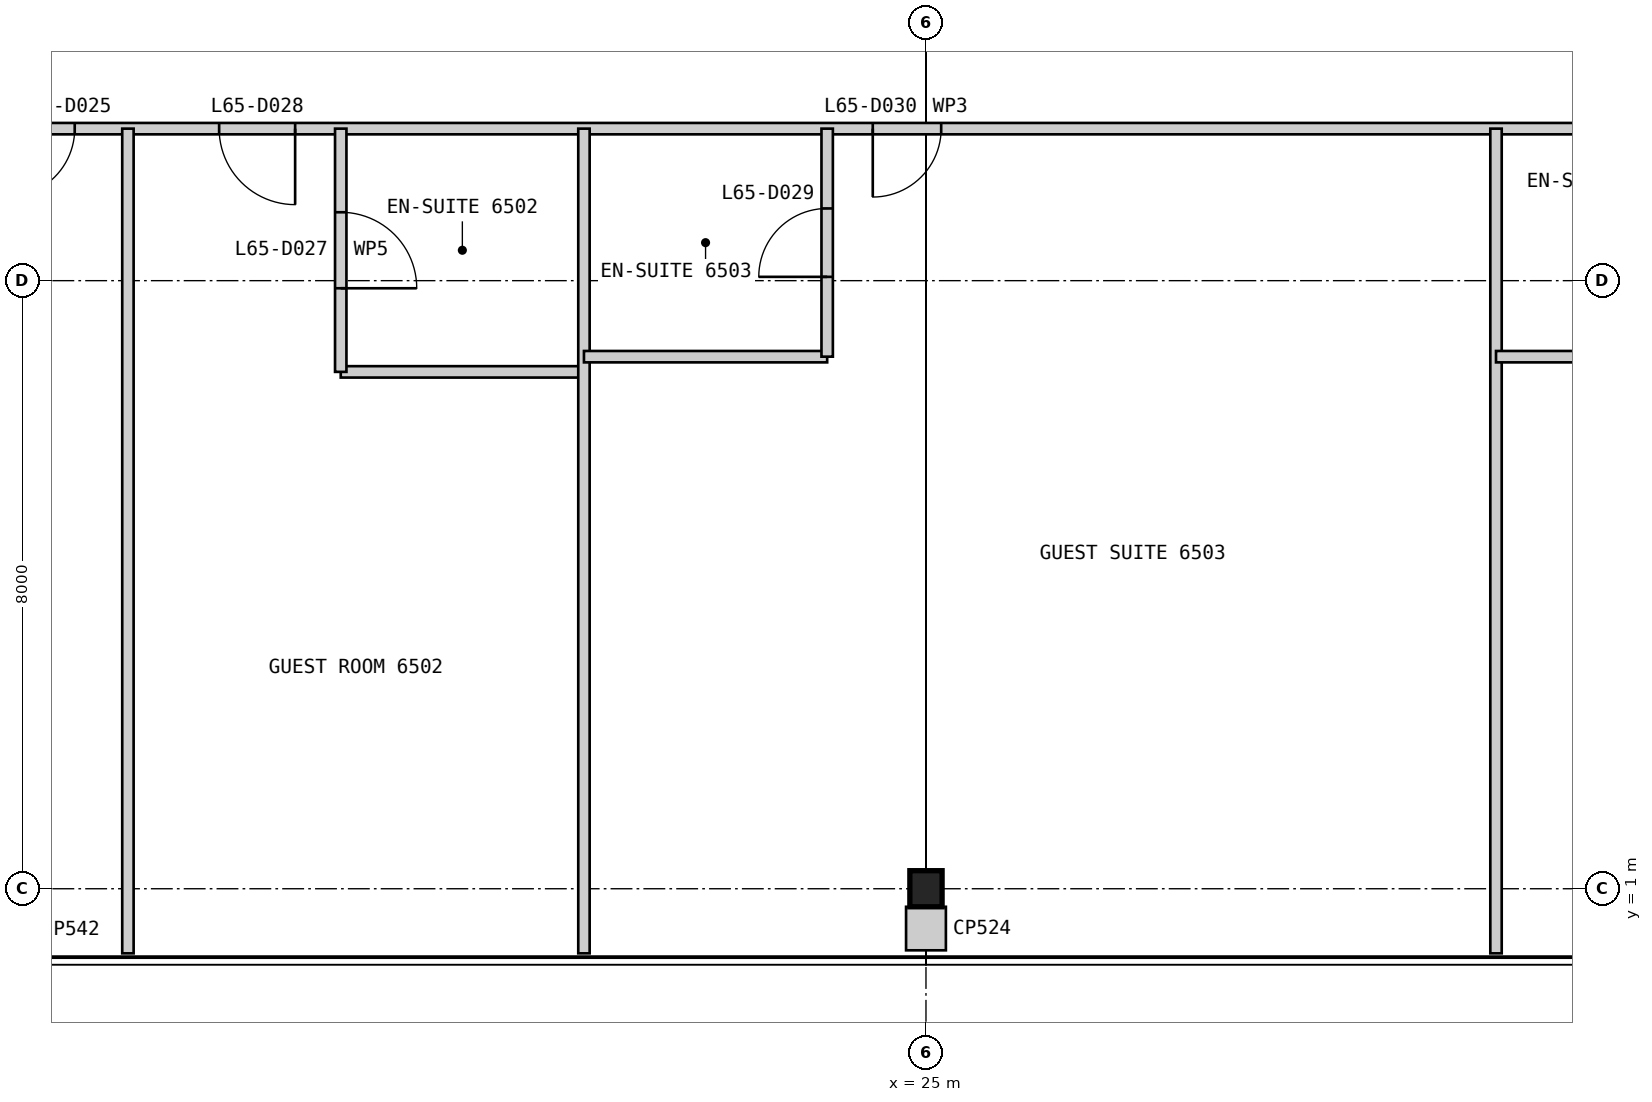
"""IFC4 building model, lengths in metres.
Left out: names, types, materials, properties, quantities, classifications, styles, units other than length and angle.
Written with IfcOpenShell. Run it as: python <this file> out.ifc"""

import sys

from ifc_helpers import new_model, si_unit, direction, frame, frame_2d, origin, origin_2d, place, context, subcontext, project, spatial, rectangle, i_section, extrude, element, fill, save


model = new_model("IFC4")
c1 = context("Model", 3, precision=1e-05, world=origin(), true_north=direction((0.0, 1.0)))
c2 = subcontext(c1, "Body", "Model", "MODEL_VIEW")
j1 = project(units=[si_unit("LENGTHUNIT", "METRE"), si_unit("PLANEANGLEUNIT", "RADIAN")], contexts=[c1])
p1 = place(None, origin())
s1 = spatial("IfcSite", under=j1, at=p1, CompositionType="ELEMENT")
p2 = place(p1, origin())
s2 = spatial("IfcBuilding", under=s1, at=p2, CompositionType="ELEMENT")
p3 = place(p2, frame((0.0, 0.0, 273.0)))
s3 = spatial("IfcBuildingStorey", under=s2, at=p3, CompositionType="ELEMENT", Elevation=273.0)
p4 = place(p3, frame((25.0, 1.0, 0.0), z_axis=(0.0, 0.0, 1.0), x_axis=(1.0, 0.0, 0.0)))
e1 = element("IfcColumn", 1, at=p4, inside=s3, PredefinedType="COLUMN", context=c2, shape_type="SweptSolid", body=[
    extrude(i_section(OverallWidth=0.424, OverallDepth=0.475, WebThickness=0.048, FlangeThickness=0.077, at=origin_2d()), origin(), (0.0, 0.0, 1.0), 3.4),
])
p5 = place(p3, frame((11.0, 11.0, 0.0), z_axis=(0.0, 0.0, 1.0), x_axis=(1.0, 0.0, 0.0)))
e2 = element("IfcWall", 2, at=p5, inside=s3, PredefinedType="PARTITIONING", context=c2, shape_type="SweptSolid", body=[
    extrude(rectangle(XDim=28.0, YDim=0.15, at=frame_2d((14.0, 0.0))), origin(), (0.0, 0.0, 1.0), 2.844),
])
p6 = place(p5, frame((1.9, 0.0, 0.0)))
e3 = element("IfcOpeningElement", 3, at=p6, cuts=e2, PredefinedType="OPENING", context=c2, shape_type="SweptSolid", body=[
    extrude(rectangle(XDim=0.9, YDim=2.1, at=frame_2d((0.45, 1.05))), frame((0.0, 0.085, 0.0), z_axis=(0.0, -1.0, 0.0), x_axis=(1.0, 0.0, 0.0)), (0.0, 0.0, 1.0), 0.17),
])
p7 = place(p5, frame((4.7, 0.0, 0.0)))
e4 = element("IfcOpeningElement", 4, at=p7, cuts=e2, PredefinedType="OPENING", context=c2, shape_type="SweptSolid", body=[
    extrude(rectangle(XDim=1.0, YDim=2.1, at=frame_2d((0.5, 1.05))), frame((0.0, 0.085, 0.0), z_axis=(0.0, -1.0, 0.0), x_axis=(1.0, 0.0, 0.0)), (0.0, 0.0, 1.0), 0.17),
])
p8 = place(p5, frame((13.3, 0.0, 0.0)))
e5 = element("IfcOpeningElement", 5, at=p8, cuts=e2, PredefinedType="OPENING", context=c2, shape_type="SweptSolid", body=[
    extrude(rectangle(XDim=0.9, YDim=2.1, at=frame_2d((0.45, 1.05))), frame((0.0, 0.085, 0.0), z_axis=(0.0, -1.0, 0.0), x_axis=(1.0, 0.0, 0.0)), (0.0, 0.0, 1.0), 0.17),
])
p9 = place(p5, frame((24.9, 0.0, 0.0)))
e6 = element("IfcOpeningElement", 6, at=p9, cuts=e2, PredefinedType="OPENING", context=c2, shape_type="SweptSolid", body=[
    extrude(rectangle(XDim=0.9, YDim=2.1, at=frame_2d((0.45, 1.05))), frame((0.0, 0.085, 0.0), z_axis=(0.0, -1.0, 0.0), x_axis=(1.0, 0.0, 0.0)), (0.0, 0.0, 1.0), 0.17),
])
p10 = place(p3, frame((14.5, 0.15, 0.0), z_axis=(0.0, 0.0, 1.0), x_axis=(0.0, 1.0, 0.0)))
e7 = element("IfcWall", 7, at=p10, inside=s3, PredefinedType="PARTITIONING", context=c2, shape_type="SweptSolid", body=[
    extrude(rectangle(XDim=10.85, YDim=0.15, at=frame_2d((5.425, 0.0))), origin(), (0.0, 0.0, 1.0), 3.25),
])
p11 = place(p3, frame((17.3, 7.8, 0.0), z_axis=(0.0, 0.0, 1.0), x_axis=(1.0, 0.0, 0.0)))
e8 = element("IfcWall", 8, at=p11, inside=s3, PredefinedType="PARTITIONING", context=c2, shape_type="SweptSolid", body=[
    extrude(rectangle(XDim=3.2, YDim=0.15, at=frame_2d((1.6, 0.0))), origin(), (0.0, 0.0, 1.0), 3.25),
])
p12 = place(p3, frame((17.3, 7.8, 0.0), z_axis=(0.0, 0.0, 1.0), x_axis=(0.0, 1.0, 0.0)))
e9 = element("IfcWall", 9, at=p12, inside=s3, PredefinedType="PARTITIONING", context=c2, shape_type="SweptSolid", body=[
    extrude(rectangle(XDim=3.2, YDim=0.15, at=frame_2d((1.6, 0.0))), origin(), (0.0, 0.0, 1.0), 3.25),
])
p13 = place(p12, frame((1.1, 0.0, 0.0)))
e10 = element("IfcOpeningElement", 10, at=p13, cuts=e9, PredefinedType="OPENING", context=c2, shape_type="SweptSolid", body=[
    extrude(rectangle(XDim=1.0, YDim=2.1, at=frame_2d((0.5, 1.05))), frame((0.0, 0.085, 0.0), z_axis=(0.0, -1.0, 0.0), x_axis=(1.0, 0.0, 0.0)), (0.0, 0.0, 1.0), 0.17),
])
p14 = place(p3, frame((20.5, 0.15, 0.0), z_axis=(0.0, 0.0, 1.0), x_axis=(0.0, 1.0, 0.0)))
e11 = element("IfcWall", 11, at=p14, inside=s3, PredefinedType="PARTITIONING", context=c2, shape_type="SweptSolid", body=[
    extrude(rectangle(XDim=10.85, YDim=0.15, at=frame_2d((5.425, 0.0))), origin(), (0.0, 0.0, 1.0), 3.25),
])
p15 = place(p3, frame((20.5, 8.0, 0.0), z_axis=(0.0, 0.0, 1.0), x_axis=(1.0, 0.0, 0.0)))
e12 = element("IfcWall", 12, at=p15, inside=s3, PredefinedType="PARTITIONING", context=c2, shape_type="SweptSolid", body=[
    extrude(rectangle(XDim=3.2, YDim=0.15, at=frame_2d((1.6, 0.0))), origin(), (0.0, 0.0, 1.0), 3.25),
])
p16 = place(p3, frame((23.7, 8.0, 0.0), z_axis=(0.0, 0.0, 1.0), x_axis=(0.0, 1.0, 0.0)))
e13 = element("IfcWall", 13, at=p16, inside=s3, PredefinedType="PARTITIONING", context=c2, shape_type="SweptSolid", body=[
    extrude(rectangle(XDim=3.0, YDim=0.15, at=frame_2d((1.5, 0.0))), origin(), (0.0, 0.0, 1.0), 3.25),
])
p17 = place(p16, frame((1.05, 0.0, 0.0)))
e14 = element("IfcOpeningElement", 14, at=p17, cuts=e13, PredefinedType="OPENING", context=c2, shape_type="SweptSolid", body=[
    extrude(rectangle(XDim=0.9, YDim=2.1, at=frame_2d((0.45, 1.05))), frame((0.0, 0.085, 0.0), z_axis=(0.0, -1.0, 0.0), x_axis=(1.0, 0.0, 0.0)), (0.0, 0.0, 1.0), 0.17),
])
p18 = place(p3, frame((32.5, 0.15, 0.0), z_axis=(0.0, 0.0, 1.0), x_axis=(0.0, 1.0, 0.0)))
e15 = element("IfcWall", 15, at=p18, inside=s3, PredefinedType="PARTITIONING", context=c2, shape_type="SweptSolid", body=[
    extrude(rectangle(XDim=10.85, YDim=0.15, at=frame_2d((5.425, 0.0))), origin(), (0.0, 0.0, 1.0), 3.25),
])
p19 = place(p3, frame((32.5, 8.0, 0.0), z_axis=(0.0, 0.0, 1.0), x_axis=(1.0, 0.0, 0.0)))
e16 = element("IfcWall", 16, at=p19, inside=s3, PredefinedType="PARTITIONING", context=c2, shape_type="SweptSolid", body=[
    extrude(rectangle(XDim=2.8, YDim=0.15, at=frame_2d((1.4, 0.0))), origin(), (0.0, 0.0, 1.0), 3.25),
])
p20 = place(p3, frame((25.0, 0.19, 0.0), z_axis=(0.0, 0.0, 1.0), x_axis=(0.0, 1.0, 0.0)))
e17 = element("IfcWall", 17, at=p20, inside=s3, PredefinedType="PARTITIONING", context=c2, shape_type="SweptSolid", body=[
    extrude(rectangle(XDim=0.573, YDim=0.524, at=frame_2d((0.286, 0.0))), origin(), (0.0, 0.0, 1.0), 3.25),
])
p21 = place(p6, frame((0.9, 0.0, 0.0), z_axis=(0.0, 0.0, 1.0), x_axis=(-1.0, 0.0, 0.0)))
e18 = element("IfcDoor", 18, at=p21, inside=s3, OperationType="SINGLE_SWING_RIGHT", PredefinedType="DOOR", context=c2, shape_type="SweptSolid", body=[
    extrude(rectangle(XDim=0.9, YDim=2.1, at=frame_2d((0.45, 1.05))), frame((0.0, 0.025, 0.0), z_axis=(0.0, -1.0, 0.0), x_axis=(1.0, 0.0, 0.0)), (0.0, 0.0, 1.0), 0.05),
])
fill(e3, e18)
p22 = place(p13, frame((1.0, 0.0, 0.0), z_axis=(0.0, 0.0, 1.0), x_axis=(-1.0, 0.0, 0.0)))
e19 = element("IfcDoor", 19, at=p22, inside=s3, OperationType="SINGLE_SWING_RIGHT", PredefinedType="DOOR", context=c2, shape_type="SweptSolid", body=[
    extrude(rectangle(XDim=1.0, YDim=2.1, at=frame_2d((0.5, 1.05))), frame((0.0, 0.025, 0.0), z_axis=(0.0, -1.0, 0.0), x_axis=(1.0, 0.0, 0.0)), (0.0, 0.0, 1.0), 0.05),
])
fill(e10, e19)
p23 = place(p7, frame((1.0, 0.0, 0.0), z_axis=(0.0, 0.0, 1.0), x_axis=(-1.0, 0.0, 0.0)))
e20 = element("IfcDoor", 20, at=p23, inside=s3, OperationType="SINGLE_SWING_LEFT", PredefinedType="DOOR", context=c2, shape_type="SweptSolid", body=[
    extrude(rectangle(XDim=1.0, YDim=2.1, at=frame_2d((0.5, 1.05))), frame((0.0, 0.025, 0.0), z_axis=(0.0, -1.0, 0.0), x_axis=(1.0, 0.0, 0.0)), (0.0, 0.0, 1.0), 0.05),
])
fill(e4, e20)
p24 = place(p17, origin())
e21 = element("IfcDoor", 21, at=p24, inside=s3, OperationType="SINGLE_SWING_LEFT", PredefinedType="DOOR", context=c2, shape_type="SweptSolid", body=[
    extrude(rectangle(XDim=0.9, YDim=2.1, at=frame_2d((0.45, 1.05))), frame((0.0, 0.025, 0.0), z_axis=(0.0, -1.0, 0.0), x_axis=(1.0, 0.0, 0.0)), (0.0, 0.0, 1.0), 0.05),
])
fill(e14, e21)
p25 = place(p8, frame((0.9, 0.0, 0.0), z_axis=(0.0, 0.0, 1.0), x_axis=(-1.0, 0.0, 0.0)))
e22 = element("IfcDoor", 22, at=p25, inside=s3, OperationType="SINGLE_SWING_RIGHT", PredefinedType="DOOR", context=c2, shape_type="SweptSolid", body=[
    extrude(rectangle(XDim=0.9, YDim=2.1, at=frame_2d((0.45, 1.05))), frame((0.0, 0.025, 0.0), z_axis=(0.0, -1.0, 0.0), x_axis=(1.0, 0.0, 0.0)), (0.0, 0.0, 1.0), 0.05),
])
fill(e5, e22)
save(model, sys.argv[1])
